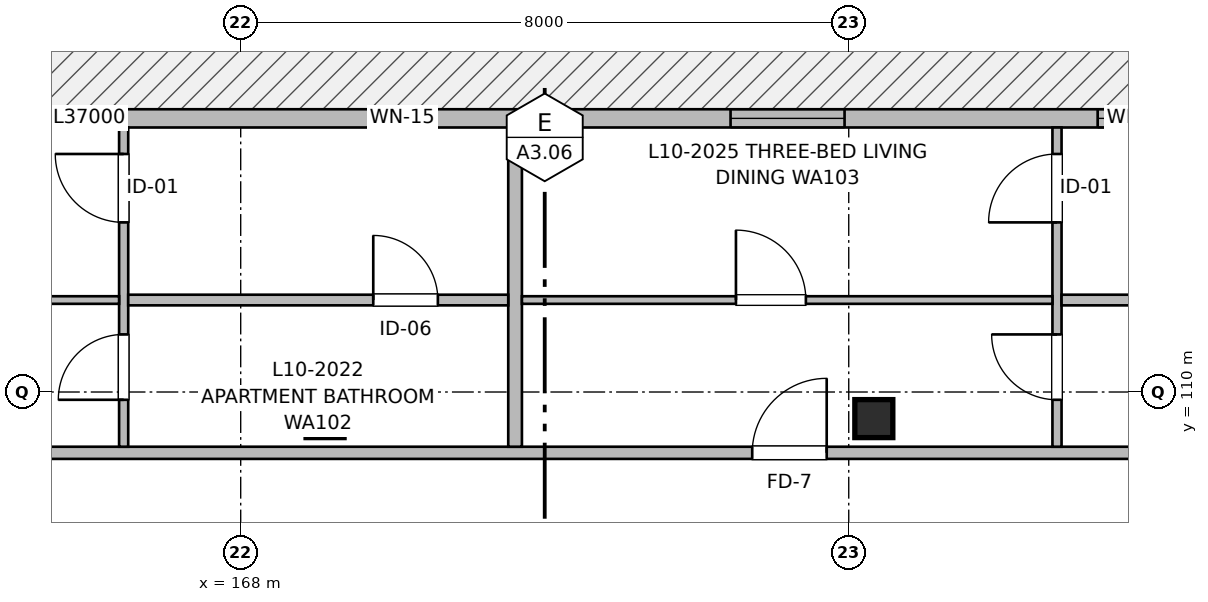
"""IFC4 building model, lengths in metres.
Left out: names, types, materials, properties, quantities, classifications, styles, units other than length and angle.
Written with IfcOpenShell. Run it as: python <this file> out.ifc"""

import sys

from ifc_helpers import new_model, si_unit, direction, frame, frame_2d, origin, origin_2d, place, context, subcontext, project, spatial, rectangle, extrude, element, fill, save


model = new_model("IFC4")
c1 = context("Model", 3, precision=1e-05, world=origin(), true_north=direction((0.0, 1.0)))
c2 = subcontext(c1, "Body", "Model", "MODEL_VIEW")
j1 = project(units=[si_unit("LENGTHUNIT", "METRE"), si_unit("PLANEANGLEUNIT", "RADIAN")], contexts=[c1])
p1 = place(None, origin())
s1 = spatial("IfcSite", under=j1, at=p1, CompositionType="ELEMENT")
p2 = place(p1, origin())
s2 = spatial("IfcBuilding", under=s1, at=p2, CompositionType="ELEMENT")
p3 = place(p2, frame((0.0, 0.0, 32.96)))
s3 = spatial("IfcBuildingStorey", under=s2, at=p3, CompositionType="ELEMENT", Elevation=32.96)
for number, where, z_axis, x_axis in (
    (1, (169.11, 109.65, 0.0), (0.0, 0.0, 1.0), (1.0, 0.0, 0.0)),
    (2, (176.33, 109.65, 0.0), (0.0, 0.0, 1.0), (1.0, 0.0, 0.0)),
):
    element("IfcColumn", number, at=place(p3, frame(where, z_axis=z_axis, x_axis=x_axis)), inside=s3, PredefinedType="COLUMN", context=c2, shape_type="SweptSolid", body=[
        extrude(rectangle(XDim=0.5, YDim=0.5, at=origin_2d()), origin(), (0.0, 0.0, 1.0), 3.2),
    ])
p4 = place(p3, frame((147.0, 113.6, 0.0), z_axis=(0.0, 0.0, 1.0), x_axis=(1.0, 0.0, 0.0)))
e3 = element("IfcWall", 3, at=p4, inside=s3, PredefinedType="SOLIDWALL", context=c2, shape_type="SweptSolid", body=[
    extrude(rectangle(XDim=37.0, YDim=0.24, at=frame_2d((18.5, 0.0))), origin(), (0.0, 0.0, 1.0), 2.98),
])
p5 = place(p4, frame((7.85, 0.0, 0.0)))
e4 = element("IfcOpeningElement", 4, at=p5, cuts=e3, PredefinedType="OPENING", context=c2, shape_type="SweptSolid", body=[
    extrude(rectangle(XDim=1.35, YDim=2.2, at=frame_2d((0.675, 1.1))), frame((0.0, 0.13, 0.0), z_axis=(0.0, -1.0, 0.0), x_axis=(1.0, 0.0, 0.0)), (0.0, 0.0, 1.0), 0.26),
])
p6 = place(p4, frame((4.1, 0.0, 0.9)))
e5 = element("IfcOpeningElement", 5, at=p6, cuts=e3, PredefinedType="OPENING", context=c2, shape_type="SweptSolid", body=[
    extrude(rectangle(XDim=1.05, YDim=1.15, at=frame_2d((0.525, 0.575))), frame((0.0, 0.13, 0.0), z_axis=(0.0, -1.0, 0.0), x_axis=(1.0, 0.0, 0.0)), (0.0, 0.0, 1.0), 0.26),
])
p7 = place(p4, frame((13.275, 0.0, 0.9)))
e6 = element("IfcOpeningElement", 6, at=p7, cuts=e3, PredefinedType="OPENING", context=c2, shape_type="SweptSolid", body=[
    extrude(rectangle(XDim=1.2, YDim=1.05, at=frame_2d((0.6, 0.525))), frame((0.0, 0.13, 0.0), z_axis=(0.0, -1.0, 0.0), x_axis=(1.0, 0.0, 0.0)), (0.0, 0.0, 1.0), 0.26),
])
p8 = place(p4, frame((22.8, 0.0, 0.9)))
e7 = element("IfcOpeningElement", 7, at=p8, cuts=e3, PredefinedType="OPENING", context=c2, shape_type="SweptSolid", body=[
    extrude(rectangle(XDim=0.65, YDim=0.95, at=frame_2d((0.325, 0.475))), frame((0.0, 0.13, 0.0), z_axis=(0.0, -1.0, 0.0), x_axis=(1.0, 0.0, 0.0)), (0.0, 0.0, 1.0), 0.26),
])
p9 = place(p4, frame((32.275, 0.0, 0.62)))
e8 = element("IfcOpeningElement", 8, at=p9, cuts=e3, PredefinedType="OPENING", context=c2, shape_type="SweptSolid", body=[
    extrude(rectangle(XDim=1.1, YDim=1.6, at=frame_2d((0.55, 0.8))), frame((0.0, 0.13, 0.0), z_axis=(0.0, -1.0, 0.0), x_axis=(1.0, 0.0, 0.0)), (0.0, 0.0, 1.0), 0.26),
])
p10 = place(p4, frame((27.445, 0.0, 0.82)))
e9 = element("IfcOpeningElement", 9, at=p10, cuts=e3, PredefinedType="OPENING", context=c2, shape_type="SweptSolid", body=[
    extrude(rectangle(XDim=1.5, YDim=1.4, at=frame_2d((0.75, 0.7))), frame((0.0, 0.13, 0.0), z_axis=(0.0, -1.0, 0.0), x_axis=(1.0, 0.0, 0.0)), (0.0, 0.0, 1.0), 0.26),
])
p11 = place(p3, frame((147.16, 109.2, 0.0), z_axis=(0.0, 0.0, 1.0), x_axis=(1.0, 0.0, 0.0)))
e10 = element("IfcWall", 10, at=p11, inside=s3, PredefinedType="PARTITIONING", context=c2, shape_type="SweptSolid", body=[
    extrude(rectangle(XDim=36.68, YDim=0.16, at=frame_2d((18.34, 0.0))), origin(), (0.0, 0.0, 1.0), 2.935),
])
p12 = place(p11, frame((3.03, 0.0, 0.0)))
e11 = element("IfcOpeningElement", 11, at=p12, cuts=e10, PredefinedType="OPENING", context=c2, shape_type="SweptSolid", body=[
    extrude(rectangle(XDim=0.98, YDim=2.15, at=frame_2d((0.49, 1.075))), frame((0.0, 0.09, 0.0), z_axis=(0.0, -1.0, 0.0), x_axis=(1.0, 0.0, 0.0)), (0.0, 0.0, 1.0), 0.18),
])
p13 = place(p11, frame((15.72, 0.0, 0.0)))
e12 = element("IfcOpeningElement", 12, at=p13, cuts=e10, PredefinedType="OPENING", context=c2, shape_type="SweptSolid", body=[
    extrude(rectangle(XDim=0.98, YDim=2.15, at=frame_2d((0.49, 1.075))), frame((0.0, 0.09, 0.0), z_axis=(0.0, -1.0, 0.0), x_axis=(1.0, 0.0, 0.0)), (0.0, 0.0, 1.0), 0.18),
])
p14 = place(p11, frame((27.57, 0.0, 0.0)))
e13 = element("IfcOpeningElement", 13, at=p14, cuts=e10, PredefinedType="OPENING", context=c2, shape_type="SweptSolid", body=[
    extrude(rectangle(XDim=0.98, YDim=2.15, at=frame_2d((0.49, 1.075))), frame((0.0, 0.09, 0.0), z_axis=(0.0, -1.0, 0.0), x_axis=(1.0, 0.0, 0.0)), (0.0, 0.0, 1.0), 0.18),
])
p15 = place(p3, frame((171.61, 109.28, 0.0), z_axis=(0.0, 0.0, 1.0), x_axis=(0.0, 1.0, 0.0)))
e14 = element("IfcWall", 14, at=p15, inside=s3, PredefinedType="PARTITIONING", context=c2, shape_type="SweptSolid", body=[
    extrude(rectangle(XDim=4.2, YDim=0.18, at=frame_2d((2.1, 0.0))), origin(), (0.0, 0.0, 1.0), 2.935),
])
p16 = place(p3, frame((166.46, 109.28, 0.0), z_axis=(0.0, 0.0, 1.0), x_axis=(0.0, 1.0, 0.0)))
e15 = element("IfcWall", 15, at=p16, inside=s3, PredefinedType="PARTITIONING", context=c2, shape_type="SweptSolid", body=[
    extrude(rectangle(XDim=4.2, YDim=0.12, at=frame_2d((2.1, 0.0))), origin(), (0.0, 0.0, 1.0), 2.935),
])
p17 = place(p16, frame((0.618, 0.0, 0.0)))
e16 = element("IfcOpeningElement", 16, at=p17, cuts=e15, PredefinedType="OPENING", context=c2, shape_type="SweptSolid", body=[
    extrude(rectangle(XDim=0.86, YDim=2.1, at=frame_2d((0.43, 1.05))), frame((0.0, 0.07, 0.0), z_axis=(0.0, -1.0, 0.0), x_axis=(1.0, 0.0, 0.0)), (0.0, 0.0, 1.0), 0.14),
])
p18 = place(p16, frame((2.951, 0.0, 0.0)))
e17 = element("IfcOpeningElement", 17, at=p18, cuts=e15, PredefinedType="OPENING", context=c2, shape_type="SweptSolid", body=[
    extrude(rectangle(XDim=0.9, YDim=2.1, at=frame_2d((0.45, 1.05))), frame((0.0, 0.07, 0.0), z_axis=(0.0, -1.0, 0.0), x_axis=(1.0, 0.0, 0.0)), (0.0, 0.0, 1.0), 0.14),
])
p19 = place(p3, frame((166.52, 111.21, 0.0), z_axis=(0.0, 0.0, 1.0), x_axis=(1.0, 0.0, 0.0)))
e18 = element("IfcWall", 18, at=p19, inside=s3, PredefinedType="PARTITIONING", context=c2, shape_type="SweptSolid", body=[
    extrude(rectangle(XDim=5.0, YDim=0.14, at=frame_2d((2.5, 0.0))), origin(), (0.0, 0.0, 1.0), 2.935),
])
p20 = place(p19, frame((3.224, 0.0, 0.0)))
e19 = element("IfcOpeningElement", 19, at=p20, cuts=e18, PredefinedType="OPENING", context=c2, shape_type="SweptSolid", body=[
    extrude(rectangle(XDim=0.85, YDim=2.05, at=frame_2d((0.425, 1.025))), frame((0.0, 0.08, 0.0), z_axis=(0.0, -1.0, 0.0), x_axis=(1.0, 0.0, 0.0)), (0.0, 0.0, 1.0), 0.16),
])
p21 = place(p3, frame((159.48, 111.21, 0.0), z_axis=(0.0, 0.0, 1.0), x_axis=(1.0, 0.0, 0.0)))
e20 = element("IfcWall", 20, at=p21, inside=s3, PredefinedType="PARTITIONING", context=c2, shape_type="SweptSolid", body=[
    extrude(rectangle(XDim=6.92, YDim=0.1, at=frame_2d((3.46, 0.0))), origin(), (0.0, 0.0, 1.0), 2.935),
])
p22 = place(p21, frame((3.192, 0.0, 0.0)))
e21 = element("IfcOpeningElement", 21, at=p22, cuts=e20, PredefinedType="OPENING", context=c2, shape_type="SweptSolid", body=[
    extrude(rectangle(XDim=0.92, YDim=2.1, at=frame_2d((0.46, 1.05))), frame((0.0, 0.06, 0.0), z_axis=(0.0, -1.0, 0.0), x_axis=(1.0, 0.0, 0.0)), (0.0, 0.0, 1.0), 0.12),
])
p23 = place(p3, frame((178.74, 109.28, 0.0), z_axis=(0.0, 0.0, 1.0), x_axis=(0.0, 1.0, 0.0)))
e22 = element("IfcWall", 22, at=p23, inside=s3, PredefinedType="PARTITIONING", context=c2, shape_type="SweptSolid", body=[
    extrude(rectangle(XDim=4.2, YDim=0.12, at=frame_2d((2.1, 0.0))), origin(), (0.0, 0.0, 1.0), 2.935),
])
p24 = place(p23, frame((0.618, 0.0, 0.0)))
e23 = element("IfcOpeningElement", 23, at=p24, cuts=e22, PredefinedType="OPENING", context=c2, shape_type="SweptSolid", body=[
    extrude(rectangle(XDim=0.86, YDim=2.1, at=frame_2d((0.43, 1.05))), frame((0.0, 0.07, 0.0), z_axis=(0.0, -1.0, 0.0), x_axis=(1.0, 0.0, 0.0)), (0.0, 0.0, 1.0), 0.14),
])
p25 = place(p23, frame((2.951, 0.0, 0.0)))
e24 = element("IfcOpeningElement", 24, at=p25, cuts=e22, PredefinedType="OPENING", context=c2, shape_type="SweptSolid", body=[
    extrude(rectangle(XDim=0.9, YDim=2.1, at=frame_2d((0.45, 1.05))), frame((0.0, 0.07, 0.0), z_axis=(0.0, -1.0, 0.0), x_axis=(1.0, 0.0, 0.0)), (0.0, 0.0, 1.0), 0.14),
])
p26 = place(p3, frame((178.8, 111.21, 0.0), z_axis=(0.0, 0.0, 1.0), x_axis=(1.0, 0.0, 0.0)))
e25 = element("IfcWall", 25, at=p26, inside=s3, PredefinedType="PARTITIONING", context=c2, shape_type="SweptSolid", body=[
    extrude(rectangle(XDim=5.04, YDim=0.14, at=frame_2d((2.52, 0.0))), origin(), (0.0, 0.0, 1.0), 2.935),
])
p27 = place(p26, frame((2.04, 0.0, 0.0)))
e26 = element("IfcOpeningElement", 26, at=p27, cuts=e25, PredefinedType="OPENING", context=c2, shape_type="SweptSolid", body=[
    extrude(rectangle(XDim=0.85, YDim=2.05, at=frame_2d((0.425, 1.025))), frame((0.0, 0.08, 0.0), z_axis=(0.0, -1.0, 0.0), x_axis=(1.0, 0.0, 0.0)), (0.0, 0.0, 1.0), 0.16),
])
p28 = place(p3, frame((171.7, 111.21, 0.0), z_axis=(0.0, 0.0, 1.0), x_axis=(1.0, 0.0, 0.0)))
e27 = element("IfcWall", 27, at=p28, inside=s3, PredefinedType="PARTITIONING", context=c2, shape_type="SweptSolid", body=[
    extrude(rectangle(XDim=6.98, YDim=0.1, at=frame_2d((3.49, 0.0))), origin(), (0.0, 0.0, 1.0), 2.935),
])
p29 = place(p28, frame((2.816, 0.0, 0.0)))
e28 = element("IfcOpeningElement", 28, at=p29, cuts=e27, PredefinedType="OPENING", context=c2, shape_type="SweptSolid", body=[
    extrude(rectangle(XDim=0.92, YDim=2.1, at=frame_2d((0.46, 1.05))), frame((0.0, 0.06, 0.0), z_axis=(0.0, -1.0, 0.0), x_axis=(1.0, 0.0, 0.0)), (0.0, 0.0, 1.0), 0.12),
])
p30 = place(p8, origin())
e29 = element("IfcWindow", 29, at=p30, inside=s3, PartitioningType="SINGLE_PANEL", PredefinedType="WINDOW", context=c2, shape_type="SweptSolid", body=[
    extrude(rectangle(XDim=0.65, YDim=0.95, at=frame_2d((0.325, 0.475))), frame((0.0, 0.03, 0.0), z_axis=(0.0, -1.0, 0.0), x_axis=(1.0, 0.0, 0.0)), (0.0, 0.0, 1.0), 0.06),
])
fill(e7, e29)
p31 = place(p9, origin())
e30 = element("IfcWindow", 30, at=p31, inside=s3, PartitioningType="SINGLE_PANEL", PredefinedType="WINDOW", context=c2, shape_type="SweptSolid", body=[
    extrude(rectangle(XDim=1.1, YDim=1.6, at=frame_2d((0.55, 0.8))), frame((0.0, 0.03, 0.0), z_axis=(0.0, -1.0, 0.0), x_axis=(1.0, 0.0, 0.0)), (0.0, 0.0, 1.0), 0.06),
])
fill(e8, e30)
p32 = place(p17, origin())
e31 = element("IfcDoor", 31, at=p32, inside=s3, OperationType="SINGLE_SWING_LEFT", PredefinedType="DOOR", context=c2, shape_type="SweptSolid", body=[
    extrude(rectangle(XDim=0.86, YDim=2.1, at=frame_2d((0.43, 1.05))), frame((0.0, 0.025, 0.0), z_axis=(0.0, -1.0, 0.0), x_axis=(1.0, 0.0, 0.0)), (0.0, 0.0, 1.0), 0.05),
])
fill(e16, e31)
p33 = place(p18, origin())
e32 = element("IfcDoor", 32, at=p33, inside=s3, OperationType="SINGLE_SWING_RIGHT", PredefinedType="DOOR", context=c2, shape_type="SweptSolid", body=[
    extrude(rectangle(XDim=0.9, YDim=2.1, at=frame_2d((0.45, 1.05))), frame((0.0, 0.025, 0.0), z_axis=(0.0, -1.0, 0.0), x_axis=(1.0, 0.0, 0.0)), (0.0, 0.0, 1.0), 0.05),
])
fill(e17, e32)
p34 = place(p20, origin())
e33 = element("IfcDoor", 33, at=p34, inside=s3, OperationType="SINGLE_SWING_LEFT", PredefinedType="DOOR", context=c2, shape_type="SweptSolid", body=[
    extrude(rectangle(XDim=0.85, YDim=2.05, at=frame_2d((0.425, 1.025))), frame((0.0, 0.025, 0.0), z_axis=(0.0, -1.0, 0.0), x_axis=(1.0, 0.0, 0.0)), (0.0, 0.0, 1.0), 0.05),
])
fill(e19, e33)
p35 = place(p14, origin())
e34 = element("IfcDoor", 34, at=p35, inside=s3, OperationType="SINGLE_SWING_RIGHT", PredefinedType="DOOR", context=c2, shape_type="SweptSolid", body=[
    extrude(rectangle(XDim=0.98, YDim=2.15, at=frame_2d((0.49, 1.075))), frame((0.0, 0.025, 0.0), z_axis=(0.0, -1.0, 0.0), x_axis=(1.0, 0.0, 0.0)), (0.0, 0.0, 1.0), 0.05),
])
fill(e13, e34)
p36 = place(p29, origin())
e35 = element("IfcDoor", 35, at=p36, inside=s3, OperationType="SINGLE_SWING_LEFT", PredefinedType="DOOR", context=c2, shape_type="SweptSolid", body=[
    extrude(rectangle(XDim=0.92, YDim=2.1, at=frame_2d((0.46, 1.05))), frame((0.0, 0.025, 0.0), z_axis=(0.0, -1.0, 0.0), x_axis=(1.0, 0.0, 0.0)), (0.0, 0.0, 1.0), 0.05),
])
fill(e28, e35)
p37 = place(p24, origin())
e36 = element("IfcDoor", 36, at=p37, inside=s3, OperationType="SINGLE_SWING_RIGHT", PredefinedType="DOOR", context=c2, shape_type="SweptSolid", body=[
    extrude(rectangle(XDim=0.86, YDim=2.1, at=frame_2d((0.43, 1.05))), frame((0.0, 0.025, 0.0), z_axis=(0.0, -1.0, 0.0), x_axis=(1.0, 0.0, 0.0)), (0.0, 0.0, 1.0), 0.05),
])
fill(e23, e36)
p38 = place(p25, origin())
e37 = element("IfcDoor", 37, at=p38, inside=s3, OperationType="SINGLE_SWING_LEFT", PredefinedType="DOOR", context=c2, shape_type="SweptSolid", body=[
    extrude(rectangle(XDim=0.9, YDim=2.1, at=frame_2d((0.45, 1.05))), frame((0.0, 0.025, 0.0), z_axis=(0.0, -1.0, 0.0), x_axis=(1.0, 0.0, 0.0)), (0.0, 0.0, 1.0), 0.05),
])
fill(e24, e37)
p39 = place(p10, origin())
e38 = element("IfcWindow", 38, at=p39, inside=s3, PartitioningType="SINGLE_PANEL", PredefinedType="WINDOW", context=c2, shape_type="SweptSolid", body=[
    extrude(rectangle(XDim=1.5, YDim=1.4, at=frame_2d((0.75, 0.7))), frame((0.0, 0.03, 0.0), z_axis=(0.0, -1.0, 0.0), x_axis=(1.0, 0.0, 0.0)), (0.0, 0.0, 1.0), 0.06),
])
fill(e9, e38)
save(model, sys.argv[1])
